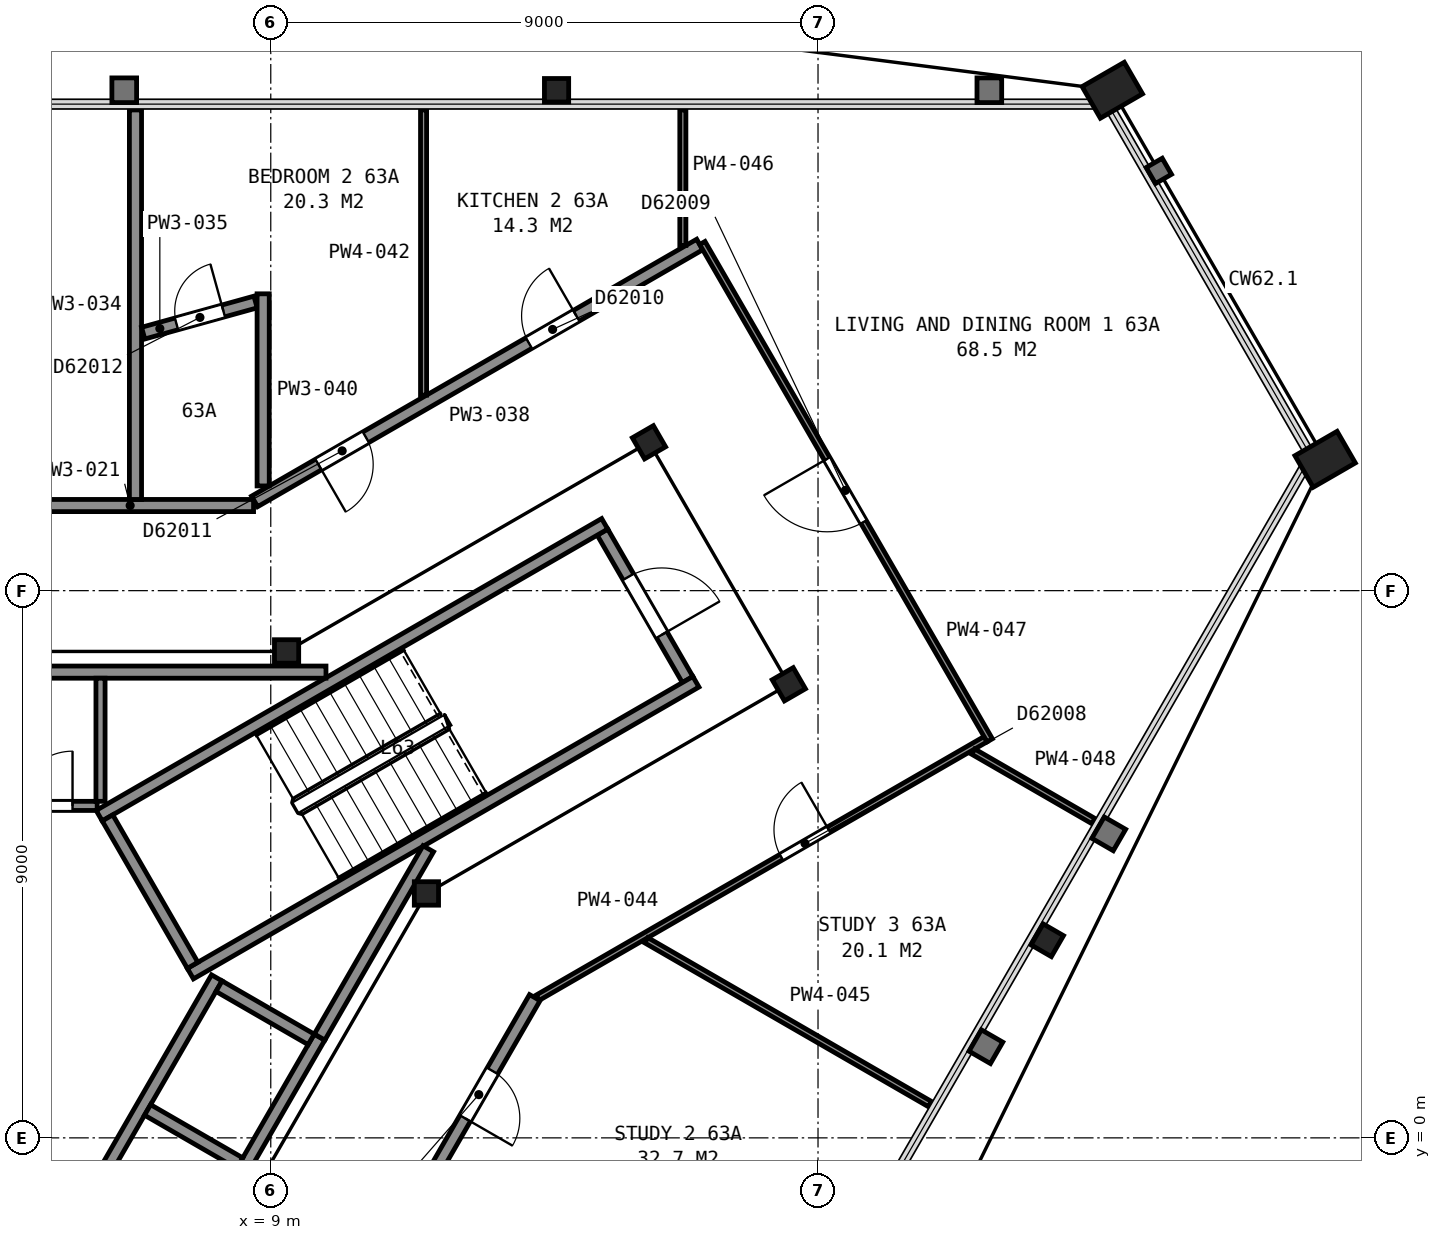
"""IFC4 building model, lengths in metres.
Left out: names, types, materials, properties, quantities, classifications, styles, units other than length and angle.
Written with IfcOpenShell. Run it as: python <this file> out.ifc"""

import sys

from ifc_helpers import new_model, si_unit, direction, frame, frame_2d, origin, origin_2d, place, context, subcontext, project, spatial, rectangle, hollow_rectangle, i_section, extrude, element, fill, save


model = new_model("IFC4")
c1 = context("Model", 3, precision=1e-05, world=origin(), true_north=direction((0.0, 1.0)))
c2 = subcontext(c1, "Body", "Model", "MODEL_VIEW")
j1 = project(units=[si_unit("LENGTHUNIT", "METRE"), si_unit("PLANEANGLEUNIT", "RADIAN")], contexts=[c1])
p1 = place(None, origin())
s1 = spatial("IfcSite", under=j1, at=p1, CompositionType="ELEMENT")
p2 = place(p1, origin())
s2 = spatial("IfcBuilding", under=s1, at=p2, CompositionType="ELEMENT")
p3 = place(p2, frame((0.0, 0.0, 250.8)))
s3 = spatial("IfcBuildingStorey", under=s2, at=p3, CompositionType="ELEMENT", Elevation=250.8)
p4 = place(p3, frame((22.84, 17.23, 0.0), z_axis=(0.0, 0.0, 1.0), x_axis=(0.5, -0.866025403784, 0.0)))
e1 = element("IfcColumn", 1, at=p4, inside=s3, PredefinedType="COLUMN", context=c2, shape_type="SweptSolid", body=[
    extrude(hollow_rectangle(XDim=0.6, YDim=0.8, WallThickness=0.05, at=origin_2d()), origin(), (0.0, 0.0, 1.0), 3.7),
])
for number, where, z_axis, x_axis in (
    (2, (13.7, 17.23, 0.0), (0.0, 0.0, 1.0), (1.0, 0.0, 0.0)),
    (3, (21.77, 3.25, 0.0), (0.0, 0.0, 1.0), (-0.5, -0.866, 0.0)),
):
    element("IfcColumn", number, at=place(p3, frame(where, z_axis=z_axis, x_axis=x_axis)), inside=s3, PredefinedType="COLUMN", context=c2, shape_type="SweptSolid", body=[
        extrude(i_section(OverallWidth=0.399, OverallDepth=0.386, WebThickness=0.021, FlangeThickness=0.033, FilletRadius=0.015, at=origin_2d()), origin(), (0.0, 0.0, 1.0), 3.7),
    ])
p5 = place(p3, frame((26.34, 11.16, 0.0), z_axis=(0.0, 0.0, 1.0), x_axis=(0.5, -0.866025403784, 0.0)))
e4 = element("IfcColumn", 4, at=p5, inside=s3, PredefinedType="COLUMN", context=c2, shape_type="SweptSolid", body=[
    extrude(hollow_rectangle(XDim=0.6, YDim=0.8, WallThickness=0.05, at=origin_2d()), origin(), (0.0, 0.0, 1.0), 3.7),
])
p6 = place(p3, frame((11.56, 4.02, 0.0), z_axis=(0.0, 0.0, 1.0), x_axis=(1.0, 0.0, 0.0)))
e5 = element("IfcColumn", 5, at=p6, inside=s3, PredefinedType="COLUMN", context=c2, shape_type="SweptSolid", body=[
    extrude(i_section(OverallWidth=0.399, OverallDepth=0.386, WebThickness=0.021, FlangeThickness=0.033, FilletRadius=0.015, at=origin_2d()), origin(), (0.0, 0.0, 1.0), 3.7),
])
for number, where, z_axis, x_axis in (
    (6, (17.52, 7.46, 0.0), (0.0, 0.0, 1.0), (0.5, -0.866, 0.0)),
    (7, (15.22, 11.44, 0.0), (0.0, 0.0, 1.0), (0.5, -0.866, 0.0)),
):
    element("IfcColumn", number, at=place(p3, frame(where, z_axis=z_axis, x_axis=x_axis)), inside=s3, PredefinedType="COLUMN", context=c2, shape_type="SweptSolid", body=[
        extrude(i_section(OverallWidth=0.401, OverallDepth=0.399, WebThickness=0.025, FlangeThickness=0.04, FilletRadius=0.015, at=origin_2d()), origin(), (0.0, 0.0, 1.0), 3.7),
    ])
p7 = place(p3, frame((9.26, 8.0, 0.0), z_axis=(0.0, 0.0, 1.0), x_axis=(1.0, 0.0, 0.0)))
e8 = element("IfcColumn", 8, at=p7, inside=s3, PredefinedType="COLUMN", context=c2, shape_type="SweptSolid", body=[
    extrude(i_section(OverallWidth=0.399, OverallDepth=0.386, WebThickness=0.021, FlangeThickness=0.033, FilletRadius=0.015, at=origin_2d()), origin(), (0.0, 0.0, 1.0), 3.7),
])
p8 = place(p3, frame((15.855, 7.538, 0.0), z_axis=(0.0, 0.0, 1.0), x_axis=(-0.500049511043, 0.865996816683, 0.0)))
e9 = element("IfcWall", 9, at=p8, inside=s3, PredefinedType="PARTITIONING", context=c2, shape_type="SweptSolid", body=[
    extrude(rectangle(XDim=2.8, YDim=0.2, at=frame_2d((1.4, 0.0))), origin(), (0.0, 0.0, 1.0), 3.45),
])
p9 = place(p8, frame((0.85, 0.0, 0.0)))
e10 = element("IfcOpeningElement", 10, at=p9, cuts=e9, PredefinedType="OPENING", context=c2, shape_type="SweptSolid", body=[
    extrude(rectangle(XDim=1.1, YDim=2.1, at=frame_2d((0.55, 1.05))), frame((0.0, 0.11, 0.0), z_axis=(0.0, -1.0, 0.0), x_axis=(1.0, 0.0, 0.0)), (0.0, 0.0, 1.0), 0.22),
])
for number, where, z_axis, x_axis in (
    (11, (6.178, 5.299, 0.0), (0.0, 0.0, 1.0), (0.866, 0.5, 0.0)),
    (12, (7.678, 2.701, 0.0), (0.0, 0.0, 1.0), (0.866, 0.5, 0.0)),
):
    element("IfcWall", number, at=place(p3, frame(where, z_axis=z_axis, x_axis=x_axis)), inside=s3, PredefinedType="PARTITIONING", context=c2, shape_type="SweptSolid", body=[
        extrude(rectangle(XDim=9.6, YDim=0.2, at=frame_2d((4.8, 0.0))), origin(), (0.0, 0.0, 1.0), 3.45),
    ])
p10 = place(p3, frame((7.715, 2.838, 0.0), z_axis=(0.0, 0.0, 1.0), x_axis=(-0.500049511043, 0.865996816683, 0.0)))
e13 = element("IfcWall", 13, at=p10, inside=s3, PredefinedType="PARTITIONING", context=c2, shape_type="SweptSolid", body=[
    extrude(rectangle(XDim=2.8, YDim=0.2, at=frame_2d((1.4, 0.0))), origin(), (0.0, 0.0, 1.0), 3.45),
])
p11 = place(p3, frame((7.351, -2.587, 0.0), z_axis=(0.0, 0.0, 1.0), x_axis=(0.500002801628, 0.866023786258, 0.0)))
e14 = element("IfcWall", 14, at=p11, inside=s3, PredefinedType="PARTITIONING", context=c2, shape_type="SweptSolid", body=[
    extrude(rectangle(XDim=4.9, YDim=0.2, at=frame_2d((2.45, 0.0))), origin(), (0.0, 0.0, 1.0), 3.7),
])
p12 = place(p3, frame((5.663, -1.612, 0.0), z_axis=(0.0, 0.0, 1.0), x_axis=(0.49998122708, 0.866036242063, 0.0)))
e15 = element("IfcWall", 15, at=p12, inside=s3, PredefinedType="PARTITIONING", context=c2, shape_type="SweptSolid", body=[
    extrude(rectangle(XDim=4.9, YDim=0.2, at=frame_2d((2.45, 0.0))), origin(), (0.0, 0.0, 1.0), 3.7),
])
p13 = place(p3, frame((9.665, 1.62, 0.0), z_axis=(0.0, 0.0, 1.0), x_axis=(-0.866002029911, 0.500040482552, 0.0)))
e16 = element("IfcWall", 16, at=p13, inside=s3, PredefinedType="PARTITIONING", context=c2, shape_type="SweptSolid", body=[
    extrude(rectangle(XDim=1.75, YDim=0.2, at=frame_2d((0.875, 0.0))), origin(), (0.0, 0.0, 1.0), 3.7),
])
p14 = place(p3, frame((8.49, -0.416, 0.0), z_axis=(0.0, 0.0, 1.0), x_axis=(-0.866036909293, 0.499980071345, 0.0)))
e17 = element("IfcWall", 17, at=p14, inside=s3, PredefinedType="PARTITIONING", context=c2, shape_type="SweptSolid", body=[
    extrude(rectangle(XDim=1.75, YDim=0.2, at=frame_2d((0.875, 0.0))), origin(), (0.0, 0.0, 1.0), 3.7),
])
p15 = place(p3, frame((-3.933, 7.66, 0.0), z_axis=(0.0, 0.0, 1.0), x_axis=(1.0, 0.0, 0.0)))
e18 = element("IfcWall", 18, at=p15, inside=s3, PredefinedType="PARTITIONING", context=c2, shape_type="SweptSolid", body=[
    extrude(rectangle(XDim=13.841, YDim=0.2, at=frame_2d((6.92, 0.0))), origin(), (0.0, 0.0, 1.0), 3.45),
])
p16 = place(p3, frame((0.925, 5.46, 0.0), z_axis=(0.0, 0.0, 1.0), x_axis=(1.0, 0.0, 0.0)))
e19 = element("IfcWall", 19, at=p16, inside=s3, PredefinedType="PARTITIONING", context=c2, shape_type="SweptSolid", body=[
    extrude(rectangle(XDim=5.22, YDim=0.15, at=frame_2d((2.61, 0.0))), origin(), (0.0, 0.0, 1.0), 3.45),
])
p17 = place(p16, frame((3.915, 0.0, 0.0)))
e20 = element("IfcOpeningElement", 20, at=p17, cuts=e19, PredefinedType="OPENING", context=c2, shape_type="SweptSolid", body=[
    extrude(rectangle(XDim=0.9, YDim=2.1, at=frame_2d((0.45, 1.05))), frame((0.0, 0.085, 0.0), z_axis=(0.0, -1.0, 0.0), x_axis=(1.0, 0.0, 0.0)), (0.0, 0.0, 1.0), 0.17),
])
p18 = place(p3, frame((6.2, 5.535, 0.0), z_axis=(0.0, 0.0, 1.0), x_axis=(0.0, 1.0, 0.0)))
e21 = element("IfcWall", 21, at=p18, inside=s3, PredefinedType="PARTITIONING", context=c2, shape_type="SweptSolid", body=[
    extrude(rectangle(XDim=2.025, YDim=0.15, at=frame_2d((1.013, 0.0))), origin(), (0.0, 0.0, 1.0), 3.45),
])
p19 = place(p3, frame((9.803, 1.658, 0.0), z_axis=(0.0, 0.0, 1.0), x_axis=(0.499943114462, 0.866058244174, 0.0)))
e22 = element("IfcWall", 22, at=p19, inside=s3, PredefinedType="PARTITIONING", context=c2, shape_type="SweptSolid", body=[
    extrude(rectangle(XDim=3.576, YDim=0.2, at=frame_2d((1.788, 0.0))), origin(), (0.0, 0.0, 1.0), 3.45),
])
p20 = place(p3, frame((-8.667, 10.4, 0.0), z_axis=(0.0, 0.0, 1.0), x_axis=(1.0, 0.0, 0.0)))
e23 = element("IfcWall", 23, at=p20, inside=s3, PredefinedType="PARTITIONING", context=c2, shape_type="SweptSolid", body=[
    extrude(rectangle(XDim=17.384, YDim=0.2, at=frame_2d((8.692, 0.0))), origin(), (0.0, 0.0, 1.0), 2.713),
])
p21 = place(p20, frame((12.425, 0.0, 0.0)))
e24 = element("IfcOpeningElement", 24, at=p21, cuts=e23, PredefinedType="OPENING", context=c2, shape_type="SweptSolid", body=[
    extrude(rectangle(XDim=0.9, YDim=2.1, at=frame_2d((0.45, 1.05))), frame((0.0, 0.11, 0.0), z_axis=(0.0, -1.0, 0.0), x_axis=(1.0, 0.0, 0.0)), (0.0, 0.0, 1.0), 0.22),
])
p22 = place(p20, frame((7.716, 0.0, 0.0)))
e25 = element("IfcOpeningElement", 25, at=p22, cuts=e23, PredefinedType="OPENING", context=c2, shape_type="SweptSolid", body=[
    extrude(rectangle(XDim=0.9, YDim=2.1, at=frame_2d((0.45, 1.05))), frame((0.0, 0.11, 0.0), z_axis=(0.0, -1.0, 0.0), x_axis=(1.0, 0.0, 0.0)), (0.0, 0.0, 1.0), 0.22),
])
p23 = place(p20, frame((3.358, 0.0, 0.0)))
e26 = element("IfcOpeningElement", 26, at=p23, cuts=e23, PredefinedType="OPENING", context=c2, shape_type="SweptSolid", body=[
    extrude(rectangle(XDim=0.9, YDim=2.1, at=frame_2d((0.45, 1.05))), frame((0.0, 0.11, 0.0), z_axis=(0.0, -1.0, 0.0), x_axis=(1.0, 0.0, 0.0)), (0.0, 0.0, 1.0), 0.22),
])
p24 = place(p3, frame((13.342, 2.306, 0.0), z_axis=(0.0, 0.0, 1.0), x_axis=(-0.499983003136, -0.866035216706, 0.0)))
e27 = element("IfcWall", 27, at=p24, inside=s3, PredefinedType="PARTITIONING", context=c2, shape_type="SweptSolid", body=[
    extrude(rectangle(XDim=17.385, YDim=0.2, at=frame_2d((8.692, 0.0))), origin(), (0.0, 0.0, 1.0), 2.713),
])
p25 = place(p24, frame((15.185, 0.0, 0.0)))
e28 = element("IfcOpeningElement", 28, at=p25, cuts=e27, PredefinedType="OPENING", context=c2, shape_type="SweptSolid", body=[
    extrude(rectangle(XDim=0.9, YDim=2.1, at=frame_2d((0.45, 1.05))), frame((0.0, 0.11, 0.0), z_axis=(0.0, -1.0, 0.0), x_axis=(1.0, 0.0, 0.0)), (0.0, 0.0, 1.0), 0.22),
])
p26 = place(p24, frame((12.094, 0.0, 0.0)))
e29 = element("IfcOpeningElement", 29, at=p26, cuts=e27, PredefinedType="OPENING", context=c2, shape_type="SweptSolid", body=[
    extrude(rectangle(XDim=0.9, YDim=2.1, at=frame_2d((0.45, 1.05))), frame((0.0, 0.11, 0.0), z_axis=(0.0, -1.0, 0.0), x_axis=(1.0, 0.0, 0.0)), (0.0, 0.0, 1.0), 0.22),
])
p27 = place(p24, frame((5.867, 0.0, 0.0)))
e30 = element("IfcOpeningElement", 30, at=p27, cuts=e27, PredefinedType="OPENING", context=c2, shape_type="SweptSolid", body=[
    extrude(rectangle(XDim=0.9, YDim=2.1, at=frame_2d((0.45, 1.05))), frame((0.0, 0.11, 0.0), z_axis=(0.0, -1.0, 0.0), x_axis=(1.0, 0.0, 0.0)), (0.0, 0.0, 1.0), 0.22),
])
p28 = place(p24, frame((1.392, 0.0, 0.0)))
e31 = element("IfcOpeningElement", 31, at=p28, cuts=e27, PredefinedType="OPENING", context=c2, shape_type="SweptSolid", body=[
    extrude(rectangle(XDim=0.9, YDim=2.1, at=frame_2d((0.45, 1.05))), frame((0.0, 0.11, 0.0), z_axis=(0.0, -1.0, 0.0), x_axis=(1.0, 0.0, 0.0)), (0.0, 0.0, 1.0), 0.22),
])
p29 = place(p3, frame((6.775, 10.5, 0.0), z_axis=(0.0, 0.0, 1.0), x_axis=(0.0, 1.0, 0.0)))
e32 = element("IfcWall", 32, at=p29, inside=s3, PredefinedType="PARTITIONING", context=c2, shape_type="SweptSolid", body=[
    extrude(rectangle(XDim=6.406, YDim=0.2, at=frame_2d((3.203, 0.0))), origin(), (0.0, 0.0, 1.0), 2.713),
])
p30 = place(p3, frame((8.75, 13.747, 0.0), z_axis=(0.0, 0.0, 1.0), x_axis=(-0.963674591663, -0.267079166884, 0.0)))
e33 = element("IfcWall", 33, at=p30, inside=s3, PredefinedType="PARTITIONING", context=c2, shape_type="SweptSolid", body=[
    extrude(rectangle(XDim=1.918, YDim=0.2, at=frame_2d((0.959, 0.0))), origin(), (0.0, 0.0, 1.0), 2.713),
])
p31 = place(p30, frame((0.549, 0.0, 0.0)))
e34 = element("IfcOpeningElement", 34, at=p31, cuts=e33, PredefinedType="OPENING", context=c2, shape_type="SweptSolid", body=[
    extrude(rectangle(XDim=0.8, YDim=2.1, at=frame_2d((0.4, 1.05))), frame((0.0, 0.11, 0.0), z_axis=(0.0, -1.0, 0.0), x_axis=(1.0, 0.0, 0.0)), (0.0, 0.0, 1.0), 0.22),
])
p32 = place(p3, frame((8.734, 10.468, 0.0), z_axis=(0.0, 0.0, 1.0), x_axis=(0.86608074249, 0.499904138298, 0.0)))
e35 = element("IfcWall", 35, at=p32, inside=s3, PredefinedType="PARTITIONING", context=c2, shape_type="SweptSolid", body=[
    extrude(rectangle(XDim=8.453, YDim=0.2, at=frame_2d((4.227, 0.0))), origin(), (0.0, 0.0, 1.0), 2.713),
])
p33 = place(p32, frame((5.209, 0.0, 0.0)))
e36 = element("IfcOpeningElement", 36, at=p33, cuts=e35, PredefinedType="OPENING", context=c2, shape_type="SweptSolid", body=[
    extrude(rectangle(XDim=0.9, YDim=2.1, at=frame_2d((0.45, 1.05))), frame((0.0, 0.11, 0.0), z_axis=(0.0, -1.0, 0.0), x_axis=(1.0, 0.0, 0.0)), (0.0, 0.0, 1.0), 0.22),
])
p34 = place(p32, frame((1.213, 0.0, 0.0)))
e37 = element("IfcOpeningElement", 37, at=p34, cuts=e35, PredefinedType="OPENING", context=c2, shape_type="SweptSolid", body=[
    extrude(rectangle(XDim=0.9, YDim=2.1, at=frame_2d((0.45, 1.05))), frame((0.0, 0.11, 0.0), z_axis=(0.0, -1.0, 0.0), x_axis=(1.0, 0.0, 0.0)), (0.0, 0.0, 1.0), 0.22),
])
p35 = place(p3, frame((8.875, 10.722, 0.0), z_axis=(0.0, 0.0, 1.0), x_axis=(0.0, 1.0, 0.0)))
e38 = element("IfcWall", 38, at=p35, inside=s3, PredefinedType="PARTITIONING", context=c2, shape_type="SweptSolid", body=[
    extrude(rectangle(XDim=3.16, YDim=0.2, at=frame_2d((1.58, 0.0))), origin(), (0.0, 0.0, 1.0), 2.713),
])
p36 = place(p3, frame((11.513, 12.215, 0.0), z_axis=(0.0, 0.0, 1.0), x_axis=(0.0, 1.0, 0.0)))
e39 = element("IfcWall", 39, at=p36, inside=s3, PredefinedType="PARTITIONING", context=c2, shape_type="SweptSolid", body=[
    extrude(rectangle(XDim=4.691, YDim=0.1, at=frame_2d((2.345, 0.0))), origin(), (0.0, 0.0, 1.0), 2.713),
])
p37 = place(p3, frame((20.756, 6.557, 0.0), z_axis=(0.0, 0.0, 1.0), x_axis=(-0.86606177021, -0.499937006213, 0.0)))
e40 = element("IfcWall", 40, at=p37, inside=s3, PredefinedType="PARTITIONING", context=c2, shape_type="SweptSolid", body=[
    extrude(rectangle(XDim=8.504, YDim=0.1, at=frame_2d((4.252, 0.0))), origin(), (0.0, 0.0, 1.0), 2.713),
])
p38 = place(p37, frame((2.979, 0.0, 0.0)))
e41 = element("IfcOpeningElement", 41, at=p38, cuts=e40, PredefinedType="OPENING", context=c2, shape_type="SweptSolid", body=[
    extrude(rectangle(XDim=0.9, YDim=2.1, at=frame_2d((0.45, 1.05))), frame((0.0, 0.06, 0.0), z_axis=(0.0, -1.0, 0.0), x_axis=(1.0, 0.0, 0.0)), (0.0, 0.0, 1.0), 0.12),
])
p39 = place(p3, frame((15.176, 3.25, 0.0), z_axis=(0.0, 0.0, 1.0), x_axis=(0.865941828667, -0.500144728419, 0.0)))
e42 = element("IfcWall", 42, at=p39, inside=s3, PredefinedType="PARTITIONING", context=c2, shape_type="SweptSolid", body=[
    extrude(rectangle(XDim=5.388, YDim=0.1, at=frame_2d((2.694, 0.0))), origin(), (0.0, 0.0, 1.0), 2.713),
])
p40 = place(p3, frame((15.777, 14.677, 0.0), z_axis=(0.0, 0.0, 1.0), x_axis=(0.0, 1.0, 0.0)))
e43 = element("IfcWall", 43, at=p40, inside=s3, PredefinedType="PARTITIONING", context=c2, shape_type="SweptSolid", body=[
    extrude(rectangle(XDim=2.229, YDim=0.1, at=frame_2d((1.114, 0.0))), origin(), (0.0, 0.0, 1.0), 2.713),
])
p41 = place(p3, frame((16.098, 14.718, 0.0), z_axis=(0.0, 0.0, 1.0), x_axis=(0.50030257167, -0.86585064346, 0.0)))
e44 = element("IfcWall", 44, at=p41, inside=s3, PredefinedType="PARTITIONING", context=c2, shape_type="SweptSolid", body=[
    extrude(rectangle(XDim=9.447, YDim=0.1, at=frame_2d((4.723, 0.0))), origin(), (0.0, 0.0, 1.0), 2.713),
])
p42 = place(p41, frame((4.1, 0.0, 0.0)))
e45 = element("IfcOpeningElement", 45, at=p42, cuts=e44, PredefinedType="OPENING", context=c2, shape_type="SweptSolid", body=[
    extrude(rectangle(XDim=1.2, YDim=2.1, at=frame_2d((0.6, 1.05))), frame((0.0, 0.06, 0.0), z_axis=(0.0, -1.0, 0.0), x_axis=(1.0, 0.0, 0.0)), (0.0, 0.0, 1.0), 0.12),
])
p43 = place(p3, frame((20.552, 6.353, 0.0), z_axis=(0.0, 0.0, 1.0), x_axis=(0.865865073245, -0.500277597875, 0.0)))
e46 = element("IfcWall", 46, at=p43, inside=s3, PredefinedType="PARTITIONING", context=c2, shape_type="SweptSolid", body=[
    extrude(rectangle(XDim=2.284, YDim=0.1, at=frame_2d((1.142, 0.0))), origin(), (0.0, 0.0, 1.0), 2.713),
])
p44 = place(p9, origin())
e47 = element("IfcDoor", 47, at=p44, inside=s3, OperationType="SINGLE_SWING_LEFT", PredefinedType="DOOR", context=c2, shape_type="SweptSolid", body=[
    extrude(rectangle(XDim=1.1, YDim=2.1, at=frame_2d((0.55, 1.05))), frame((0.0, 0.025, 0.0), z_axis=(0.0, -1.0, 0.0), x_axis=(1.0, 0.0, 0.0)), (0.0, 0.0, 1.0), 0.05),
])
fill(e10, e47)
p45 = place(p17, origin())
e48 = element("IfcDoor", 48, at=p45, inside=s3, OperationType="SINGLE_SWING_RIGHT", PredefinedType="DOOR", context=c2, shape_type="SweptSolid", body=[
    extrude(rectangle(XDim=0.9, YDim=2.1, at=frame_2d((0.45, 1.05))), frame((0.0, 0.025, 0.0), z_axis=(0.0, -1.0, 0.0), x_axis=(1.0, 0.0, 0.0)), (0.0, 0.0, 1.0), 0.05),
])
fill(e20, e48)
p46 = place(p28, origin())
e49 = element("IfcDoor", 49, at=p46, inside=s3, OperationType="SINGLE_SWING_RIGHT", PredefinedType="DOOR", context=c2, shape_type="SweptSolid", body=[
    extrude(rectangle(XDim=0.9, YDim=2.1, at=frame_2d((0.45, 1.05))), frame((0.0, 0.025, 0.0), z_axis=(0.0, -1.0, 0.0), x_axis=(1.0, 0.0, 0.0)), (0.0, 0.0, 1.0), 0.05),
])
fill(e31, e49)
p47 = place(p31, origin())
e50 = element("IfcDoor", 50, at=p47, inside=s3, OperationType="SINGLE_SWING_LEFT", PredefinedType="DOOR", context=c2, shape_type="SweptSolid", body=[
    extrude(rectangle(XDim=0.8, YDim=2.1, at=frame_2d((0.4, 1.05))), frame((0.0, 0.025, 0.0), z_axis=(0.0, -1.0, 0.0), x_axis=(1.0, 0.0, 0.0)), (0.0, 0.0, 1.0), 0.05),
])
fill(e34, e50)
p48 = place(p33, origin())
e51 = element("IfcDoor", 51, at=p48, inside=s3, OperationType="SINGLE_SWING_RIGHT", PredefinedType="DOOR", context=c2, shape_type="SweptSolid", body=[
    extrude(rectangle(XDim=0.9, YDim=2.1, at=frame_2d((0.45, 1.05))), frame((0.0, 0.025, 0.0), z_axis=(0.0, -1.0, 0.0), x_axis=(1.0, 0.0, 0.0)), (0.0, 0.0, 1.0), 0.05),
])
fill(e36, e51)
p49 = place(p34, origin())
e52 = element("IfcDoor", 52, at=p49, inside=s3, OperationType="SINGLE_SWING_LEFT", PredefinedType="DOOR", context=c2, shape_type="SweptSolid", body=[
    extrude(rectangle(XDim=0.9, YDim=2.1, at=frame_2d((0.45, 1.05))), frame((0.0, 0.025, 0.0), z_axis=(0.0, -1.0, 0.0), x_axis=(1.0, 0.0, 0.0)), (0.0, 0.0, 1.0), 0.05),
])
fill(e37, e52)
p50 = place(p38, origin())
e53 = element("IfcDoor", 53, at=p50, inside=s3, OperationType="SINGLE_SWING_LEFT", PredefinedType="DOOR", context=c2, shape_type="SweptSolid", body=[
    extrude(rectangle(XDim=0.9, YDim=2.1, at=frame_2d((0.45, 1.05))), frame((0.0, 0.025, 0.0), z_axis=(0.0, -1.0, 0.0), x_axis=(1.0, 0.0, 0.0)), (0.0, 0.0, 1.0), 0.05),
])
fill(e41, e53)
p51 = place(p42, origin())
e54 = element("IfcDoor", 54, at=p51, inside=s3, OperationType="SINGLE_SWING_LEFT", PredefinedType="DOOR", context=c2, shape_type="SweptSolid", body=[
    extrude(rectangle(XDim=1.2, YDim=2.1, at=frame_2d((0.6, 1.05))), frame((0.0, 0.025, 0.0), z_axis=(0.0, -1.0, 0.0), x_axis=(1.0, 0.0, 0.0)), (0.0, 0.0, 1.0), 0.05),
])
fill(e45, e54)
save(model, sys.argv[1])
